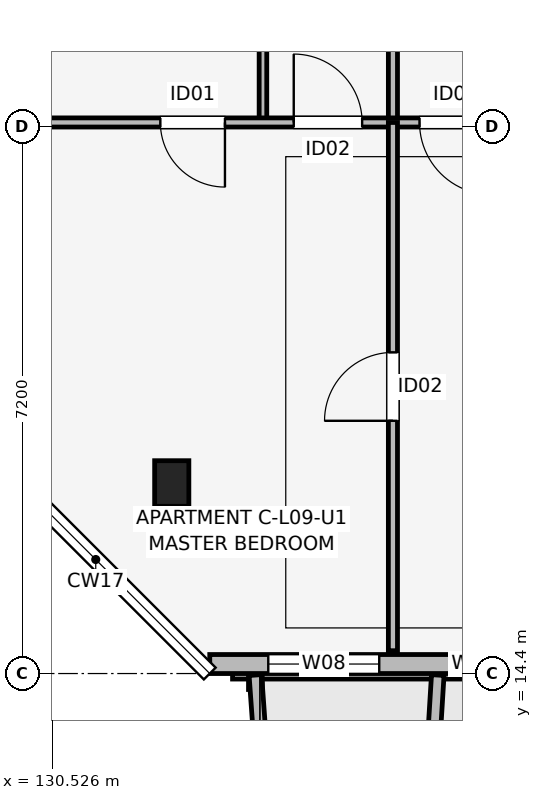
"""IFC4 building model, lengths in metres.
Left out: names, types, materials, properties, quantities, classifications, styles, units other than length and angle.
Written with IfcOpenShell. Run it as: python <this file> out.ifc"""

import sys

from ifc_helpers import new_model, si_unit, direction, frame, frame_2d, origin, origin_2d, place, context, subcontext, project, spatial, rectangle, extrude, element, fill, save


model = new_model("IFC4")
c1 = context("Model", 3, precision=1e-05, world=origin(), true_north=direction((0.0, 1.0)))
c2 = subcontext(c1, "Body", "Model", "MODEL_VIEW")
j1 = project(units=[si_unit("LENGTHUNIT", "METRE"), si_unit("PLANEANGLEUNIT", "RADIAN")], contexts=[c1])
p1 = place(None, origin())
s1 = spatial("IfcSite", under=j1, at=p1, CompositionType="ELEMENT")
p2 = place(p1, origin())
s2 = spatial("IfcBuilding", under=s1, at=p2, CompositionType="ELEMENT")
p3 = place(p2, frame((0.0, 0.0, 30.75)))
s3 = spatial("IfcBuildingStorey", under=s2, at=p3, CompositionType="ELEMENT", Elevation=30.75)
p4 = place(p3, frame((132.1, 16.9, 0.0), z_axis=(0.0, 0.0, 1.0), x_axis=(1.0, 0.0, 0.0)))
e1 = element("IfcColumn", 1, at=p4, inside=s3, PredefinedType="COLUMN", context=c2, shape_type="SweptSolid", body=[
    extrude(rectangle(XDim=0.45, YDim=0.6, at=origin_2d()), origin(), (0.0, 0.0, 1.0), 3.15),
])
p5 = place(p3, frame((132.6, 14.525, 0.0), z_axis=(0.0, 0.0, 1.0), x_axis=(1.0, 0.0, 0.0)))
e2 = element("IfcWall", 2, at=p5, inside=s3, PredefinedType="SOLIDWALL", context=c2, shape_type="SweptSolid", body=[
    extrude(rectangle(XDim=30.0, YDim=0.25, at=frame_2d((15.0, 0.0))), origin(), (0.0, 0.0, 1.0), 2.48),
])
p6 = place(p5, frame((9.9, 0.0, 0.0), z_axis=(0.0, 0.0, 1.0), x_axis=(-1.0, 0.0, 0.0)))
e3 = element("IfcOpeningElement", 3, at=p6, cuts=e2, PredefinedType="OPENING", context=c2, shape_type="SweptSolid", body=[
    extrude(rectangle(XDim=1.8, YDim=2.15, at=frame_2d((0.9, 1.075))), frame((0.0, 0.135, 0.0), z_axis=(0.0, -1.0, 0.0), x_axis=(1.0, 0.0, 0.0)), (0.0, 0.0, 1.0), 0.27),
])
p7 = place(p5, frame((24.225, 0.0, 0.0), z_axis=(0.0, 0.0, 1.0), x_axis=(-1.0, 0.0, 0.0)))
e4 = element("IfcOpeningElement", 4, at=p7, cuts=e2, PredefinedType="OPENING", context=c2, shape_type="SweptSolid", body=[
    extrude(rectangle(XDim=1.65, YDim=2.15, at=frame_2d((0.825, 1.075))), frame((0.0, 0.135, 0.0), z_axis=(0.0, -1.0, 0.0), x_axis=(1.0, 0.0, 0.0)), (0.0, 0.0, 1.0), 0.27),
])
p8 = place(p5, frame((0.77, 0.0, 0.7)))
e5 = element("IfcOpeningElement", 5, at=p8, cuts=e2, PredefinedType="OPENING", context=c2, shape_type="SweptSolid", body=[
    extrude(rectangle(XDim=1.46, YDim=1.55, at=frame_2d((0.73, 0.775))), frame((0.0, 0.135, 0.0), z_axis=(0.0, -1.0, 0.0), x_axis=(1.0, 0.0, 0.0)), (0.0, 0.0, 1.0), 0.27),
])
p9 = place(p5, frame((3.167, 0.0, 0.75)))
e6 = element("IfcOpeningElement", 6, at=p9, cuts=e2, PredefinedType="OPENING", context=c2, shape_type="SweptSolid", body=[
    extrude(rectangle(XDim=0.6, YDim=1.25, at=frame_2d((0.3, 0.625))), frame((0.0, 0.135, 0.0), z_axis=(0.0, -1.0, 0.0), x_axis=(1.0, 0.0, 0.0)), (0.0, 0.0, 1.0), 0.27),
])
p10 = place(p5, frame((5.555, 0.0, 0.75)))
e7 = element("IfcOpeningElement", 7, at=p10, cuts=e2, PredefinedType="OPENING", context=c2, shape_type="SweptSolid", body=[
    extrude(rectangle(XDim=0.72, YDim=1.35, at=frame_2d((0.36, 0.675))), frame((0.0, 0.135, 0.0), z_axis=(0.0, -1.0, 0.0), x_axis=(1.0, 0.0, 0.0)), (0.0, 0.0, 1.0), 0.27),
])
p11 = place(p5, frame((12.755, 0.0, 0.75)))
e8 = element("IfcOpeningElement", 8, at=p11, cuts=e2, PredefinedType="OPENING", context=c2, shape_type="SweptSolid", body=[
    extrude(rectangle(XDim=0.72, YDim=1.35, at=frame_2d((0.36, 0.675))), frame((0.0, 0.135, 0.0), z_axis=(0.0, -1.0, 0.0), x_axis=(1.0, 0.0, 0.0)), (0.0, 0.0, 1.0), 0.27),
])
p12 = place(p5, frame((15.34, 0.0, 0.7)))
e9 = element("IfcOpeningElement", 9, at=p12, cuts=e2, PredefinedType="OPENING", context=c2, shape_type="SweptSolid", body=[
    extrude(rectangle(XDim=1.72, YDim=1.6, at=frame_2d((0.86, 0.8))), frame((0.0, 0.135, 0.0), z_axis=(0.0, -1.0, 0.0), x_axis=(1.0, 0.0, 0.0)), (0.0, 0.0, 1.0), 0.27),
])
p13 = place(p5, frame((26.232, 0.0, 0.75)))
e10 = element("IfcOpeningElement", 10, at=p13, cuts=e2, PredefinedType="OPENING", context=c2, shape_type="SweptSolid", body=[
    extrude(rectangle(XDim=0.6, YDim=1.25, at=frame_2d((0.3, 0.625))), frame((0.0, 0.135, 0.0), z_axis=(0.0, -1.0, 0.0), x_axis=(1.0, 0.0, 0.0)), (0.0, 0.0, 1.0), 0.27),
])
p14 = place(p5, frame((28.27, 0.0, 0.75)))
e11 = element("IfcOpeningElement", 11, at=p14, cuts=e2, PredefinedType="OPENING", context=c2, shape_type="SweptSolid", body=[
    extrude(rectangle(XDim=0.72, YDim=1.35, at=frame_2d((0.36, 0.675))), frame((0.0, 0.135, 0.0), z_axis=(0.0, -1.0, 0.0), x_axis=(1.0, 0.0, 0.0)), (0.0, 0.0, 1.0), 0.27),
])
p15 = place(p3, frame((133.2, 14.38, 0.0), z_axis=(0.0, 0.0, 1.0), x_axis=(0.071317687608, -0.997453651772, 0.0)))
e12 = element("IfcWall", 12, at=p15, inside=s3, PredefinedType="ELEMENTEDWALL", context=c2, shape_type="SweptSolid", body=[
    extrude(rectangle(XDim=1.965, YDim=0.165, at=frame_2d((0.982, 0.0))), origin(), (0.0, 0.0, 1.0), 2.95),
])
p16 = place(p3, frame((135.6, 14.38, 0.0), z_axis=(0.0, 0.0, 1.0), x_axis=(-0.061170732449, -0.998127317276, 0.0)))
e13 = element("IfcWall", 13, at=p16, inside=s3, PredefinedType="ELEMENTEDWALL", context=c2, shape_type="SweptSolid", body=[
    extrude(rectangle(XDim=1.964, YDim=0.165, at=frame_2d((0.982, 0.0))), origin(), (0.0, 0.0, 1.0), 2.95),
])
p17 = place(p3, frame((133.3, 21.65, 0.0), z_axis=(0.0, 0.0, 1.0), x_axis=(0.0, 1.0, 0.0)))
e14 = element("IfcWall", 14, at=p17, inside=s3, PredefinedType="PARTITIONING", context=c2, shape_type="SweptSolid", body=[
    extrude(rectangle(XDim=2.65, YDim=0.1, at=frame_2d((1.325, 0.0))), origin(), (0.0, 0.0, 1.0), 2.38),
])
p18 = place(p3, frame((135.01, 21.65, 0.0), z_axis=(0.0, 0.0, 1.0), x_axis=(0.0, 1.0, 0.0)))
e15 = element("IfcWall", 15, at=p18, inside=s3, PredefinedType="PARTITIONING", context=c2, shape_type="SweptSolid", body=[
    extrude(rectangle(XDim=2.65, YDim=0.12, at=frame_2d((1.325, 0.0))), origin(), (0.0, 0.0, 1.0), 2.38),
])
p19 = place(p3, frame((129.74, 21.65, 0.0), z_axis=(0.0, 0.0, 1.0), x_axis=(1.0, 0.0, 0.0)))
e16 = element("IfcWall", 16, at=p19, inside=s3, PredefinedType="PARTITIONING", context=c2, shape_type="SweptSolid", body=[
    extrude(rectangle(XDim=6.92, YDim=0.12, at=frame_2d((3.46, 0.0))), origin(), (0.0, 0.0, 1.0), 2.38),
])
p20 = place(p19, frame((3.06, 0.0, 0.0), z_axis=(0.0, 0.0, 1.0), x_axis=(-1.0, 0.0, 0.0)))
e17 = element("IfcOpeningElement", 17, at=p20, cuts=e16, PredefinedType="OPENING", context=c2, shape_type="SweptSolid", body=[
    extrude(rectangle(XDim=0.85, YDim=2.08, at=frame_2d((0.425, 1.04))), frame((0.0, 0.07, 0.0), z_axis=(0.0, -1.0, 0.0), x_axis=(1.0, 0.0, 0.0)), (0.0, 0.0, 1.0), 0.14),
])
p21 = place(p19, frame((3.965, 0.0, 0.0)))
e18 = element("IfcOpeningElement", 18, at=p21, cuts=e16, PredefinedType="OPENING", context=c2, shape_type="SweptSolid", body=[
    extrude(rectangle(XDim=0.9, YDim=2.08, at=frame_2d((0.45, 1.04))), frame((0.0, 0.07, 0.0), z_axis=(0.0, -1.0, 0.0), x_axis=(1.0, 0.0, 0.0)), (0.0, 0.0, 1.0), 0.14),
])
p22 = place(p19, frame((6.57, 0.0, 0.0), z_axis=(0.0, 0.0, 1.0), x_axis=(-1.0, 0.0, 0.0)))
e19 = element("IfcOpeningElement", 19, at=p22, cuts=e16, PredefinedType="OPENING", context=c2, shape_type="SweptSolid", body=[
    extrude(rectangle(XDim=0.95, YDim=2.08, at=frame_2d((0.475, 1.04))), frame((0.0, 0.07, 0.0), z_axis=(0.0, -1.0, 0.0), x_axis=(1.0, 0.0, 0.0)), (0.0, 0.0, 1.0), 0.14),
])
p23 = place(p3, frame((135.01, 14.7, 0.0), z_axis=(0.0, 0.0, 1.0), x_axis=(0.0, 1.0, 0.0)))
e20 = element("IfcWall", 20, at=p23, inside=s3, PredefinedType="PARTITIONING", context=c2, shape_type="SweptSolid", body=[
    extrude(rectangle(XDim=6.95, YDim=0.12, at=frame_2d((3.475, 0.0))), origin(), (0.0, 0.0, 1.0), 2.38),
])
p24 = place(p23, frame((3.025, 0.0, 0.0)))
e21 = element("IfcOpeningElement", 21, at=p24, cuts=e20, PredefinedType="OPENING", context=c2, shape_type="SweptSolid", body=[
    extrude(rectangle(XDim=0.9, YDim=2.08, at=frame_2d((0.45, 1.04))), frame((0.0, 0.07, 0.0), z_axis=(0.0, -1.0, 0.0), x_axis=(1.0, 0.0, 0.0)), (0.0, 0.0, 1.0), 0.14),
])
p25 = place(p8, origin())
e22 = element("IfcWindow", 22, at=p25, inside=s3, PartitioningType="SINGLE_PANEL", PredefinedType="WINDOW", context=c2, shape_type="SweptSolid", body=[
    extrude(rectangle(XDim=1.46, YDim=1.55, at=frame_2d((0.73, 0.775))), frame((0.0, 0.03, 0.0), z_axis=(0.0, -1.0, 0.0), x_axis=(1.0, 0.0, 0.0)), (0.0, 0.0, 1.0), 0.06),
])
fill(e5, e22)
p26 = place(p9, origin())
e23 = element("IfcWindow", 23, at=p26, inside=s3, PartitioningType="SINGLE_PANEL", PredefinedType="WINDOW", context=c2, shape_type="SweptSolid", body=[
    extrude(rectangle(XDim=0.6, YDim=1.25, at=frame_2d((0.3, 0.625))), frame((0.0, 0.03, 0.0), z_axis=(0.0, -1.0, 0.0), x_axis=(1.0, 0.0, 0.0)), (0.0, 0.0, 1.0), 0.06),
])
fill(e6, e23)
p27 = place(p20, origin())
e24 = element("IfcDoor", 24, at=p27, inside=s3, OperationType="SINGLE_SWING_RIGHT", PredefinedType="DOOR", context=c2, shape_type="SweptSolid", body=[
    extrude(rectangle(XDim=0.85, YDim=2.08, at=frame_2d((0.425, 1.04))), frame((0.0, 0.025, 0.0), z_axis=(0.0, -1.0, 0.0), x_axis=(1.0, 0.0, 0.0)), (0.0, 0.0, 1.0), 0.05),
])
fill(e17, e24)
p28 = place(p21, origin())
e25 = element("IfcDoor", 25, at=p28, inside=s3, OperationType="SINGLE_SWING_LEFT", PredefinedType="DOOR", context=c2, shape_type="SweptSolid", body=[
    extrude(rectangle(XDim=0.9, YDim=2.08, at=frame_2d((0.45, 1.04))), frame((0.0, 0.025, 0.0), z_axis=(0.0, -1.0, 0.0), x_axis=(1.0, 0.0, 0.0)), (0.0, 0.0, 1.0), 0.05),
])
fill(e18, e25)
p29 = place(p22, origin())
e26 = element("IfcDoor", 26, at=p29, inside=s3, OperationType="SINGLE_SWING_RIGHT", PredefinedType="DOOR", context=c2, shape_type="SweptSolid", body=[
    extrude(rectangle(XDim=0.95, YDim=2.08, at=frame_2d((0.475, 1.04))), frame((0.0, 0.025, 0.0), z_axis=(0.0, -1.0, 0.0), x_axis=(1.0, 0.0, 0.0)), (0.0, 0.0, 1.0), 0.05),
])
fill(e19, e26)
p30 = place(p24, origin())
e27 = element("IfcDoor", 27, at=p30, inside=s3, OperationType="SINGLE_SWING_LEFT", PredefinedType="DOOR", context=c2, shape_type="SweptSolid", body=[
    extrude(rectangle(XDim=0.9, YDim=2.08, at=frame_2d((0.45, 1.04))), frame((0.0, 0.025, 0.0), z_axis=(0.0, -1.0, 0.0), x_axis=(1.0, 0.0, 0.0)), (0.0, 0.0, 1.0), 0.05),
])
fill(e21, e27)
save(model, sys.argv[1])
